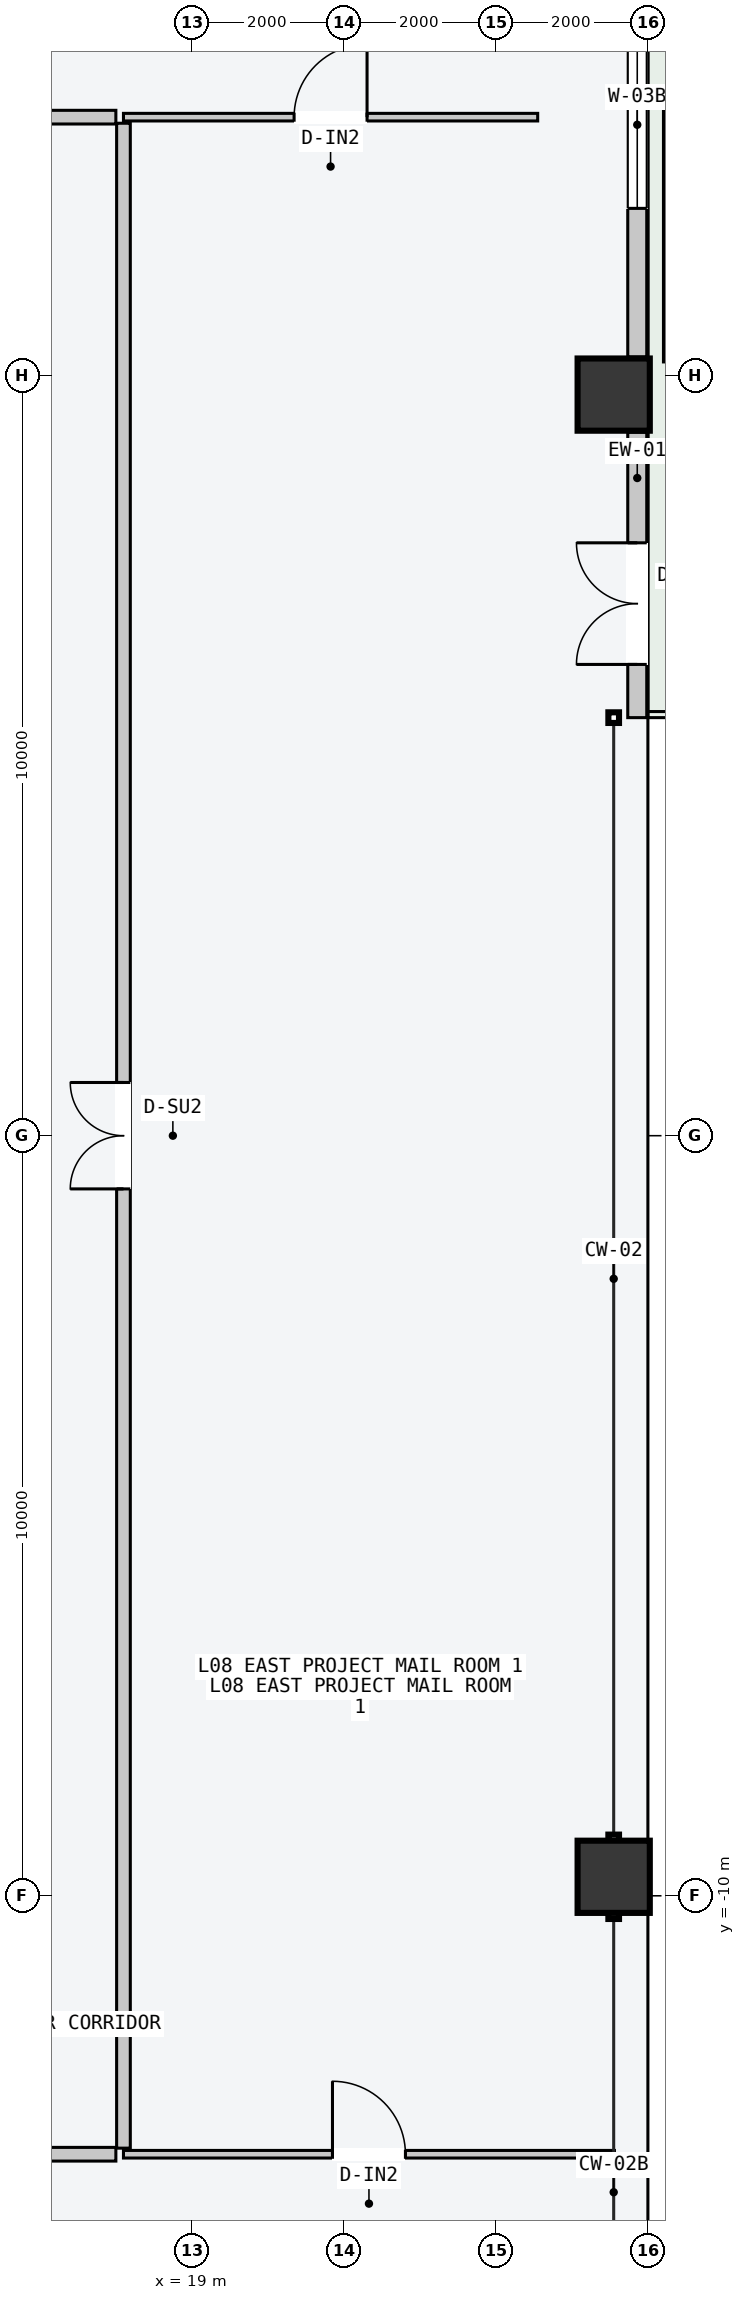
"""IFC4 building model, lengths in metres.
Left out: names, types, materials, properties, quantities, classifications, styles, units other than length and angle.
Written with IfcOpenShell. Run it as: python <this file> out.ifc"""

import sys

from ifc_helpers import new_model, si_unit, direction, frame, frame_2d, origin, origin_2d, place, context, subcontext, project, spatial, rectangle, hollow_rectangle, extrude, element, fill, save


model = new_model("IFC4")
c1 = context("Model", 3, precision=1e-05, world=origin(), true_north=direction((0.0, 1.0)))
c2 = subcontext(c1, "Body", "Model", "MODEL_VIEW")
j1 = project(units=[si_unit("LENGTHUNIT", "METRE"), si_unit("PLANEANGLEUNIT", "RADIAN")], contexts=[c1])
p1 = place(None, origin())
s1 = spatial("IfcSite", under=j1, at=p1, CompositionType="ELEMENT")
p2 = place(p1, origin())
s2 = spatial("IfcBuilding", under=s1, at=p2, CompositionType="ELEMENT")
p3 = place(p2, frame((0.0, 0.0, 34.8)))
s3 = spatial("IfcBuildingStorey", under=s2, at=p3, CompositionType="ELEMENT", Elevation=34.8)
for number, where, z_axis, x_axis in (
    (1, (24.55, -9.75, 0.0), (0.0, 0.0, 1.0), (0.0, 1.0, 0.0)),
    (2, (24.55, 9.75, 0.0), (0.0, 0.0, 1.0), (0.0, 1.0, 0.0)),
):
    element("IfcColumn", number, at=place(p3, frame(where, z_axis=z_axis, x_axis=x_axis)), inside=s3, PredefinedType="COLUMN", context=c2, shape_type="SweptSolid", body=[
        extrude(hollow_rectangle(XDim=0.95, YDim=0.95, WallThickness=0.048, at=origin_2d()), origin(), (0.0, 0.0, 1.0), 3.6),
    ])
p4 = place(p3, frame((24.86, 5.5, 0.0), z_axis=(0.0, 0.0, 1.0), x_axis=(0.0, 1.0, 0.0)))
e3 = element("IfcWall", 3, at=p4, inside=s3, PredefinedType="STANDARD", context=c2, shape_type="SweptSolid", body=[
    extrude(rectangle(XDim=3.755, YDim=0.25, at=frame_2d((1.877, 0.0))), origin(), (0.0, 0.0, 1.0), 3.4),
])
p5 = place(p4, frame((0.7, 0.0, 0.0)))
e4 = element("IfcOpeningElement", 4, at=p5, cuts=e3, PredefinedType="OPENING", context=c2, shape_type="SweptSolid", body=[
    extrude(rectangle(XDim=1.6, YDim=2.2, at=frame_2d((0.8, 1.1))), frame((0.0, 0.135, 0.0), z_axis=(0.0, -1.0, 0.0), x_axis=(1.0, 0.0, 0.0)), (0.0, 0.0, 1.0), 0.27),
])
p6 = place(p3, frame((24.86, 10.245, 0.0), z_axis=(0.0, 0.0, 1.0), x_axis=(0.0, 1.0, 0.0)))
e5 = element("IfcWall", 5, at=p6, inside=s3, PredefinedType="STANDARD", context=c2, shape_type="SweptSolid", body=[
    extrude(rectangle(XDim=7.31, YDim=0.25, at=frame_2d((3.655, 0.0))), origin(), (0.0, 0.0, 1.0), 3.4),
])
p7 = place(p6, frame((1.955, 0.0, 0.85)))
e6 = element("IfcOpeningElement", 6, at=p7, cuts=e5, PredefinedType="OPENING", context=c2, shape_type="SweptSolid", body=[
    extrude(rectangle(XDim=2.2, YDim=2.1, at=frame_2d((1.1, 1.05))), frame((0.0, 0.135, 0.0), z_axis=(0.0, -1.0, 0.0), x_axis=(1.0, 0.0, 0.0)), (0.0, 0.0, 1.0), 0.27),
])
p8 = place(p3, frame((-18.0, 13.4, 0.0), z_axis=(0.0, 0.0, 1.0), x_axis=(1.0, 0.0, 0.0)))
e7 = element("IfcWall", 7, at=p8, inside=s3, PredefinedType="PARTITIONING", context=c2, shape_type="SweptSolid", body=[
    extrude(rectangle(XDim=36.0, YDim=0.18, at=frame_2d((18.0, 0.0))), origin(), (0.0, 0.0, 1.0), 3.4),
])
p9 = place(p8, frame((7.185, 0.0, 0.0)))
e8 = element("IfcOpeningElement", 8, at=p9, cuts=e7, PredefinedType="OPENING", context=c2, shape_type="SweptSolid", body=[
    extrude(rectangle(XDim=1.24, YDim=2.24, at=frame_2d((0.62, 1.12))), frame((0.0, 0.1, 0.0), z_axis=(0.0, -1.0, 0.0), x_axis=(1.0, 0.0, 0.0)), (0.0, 0.0, 1.0), 0.2),
])
p10 = place(p8, frame((21.083, 0.0, 0.0)))
e9 = element("IfcOpeningElement", 9, at=p10, cuts=e7, PredefinedType="OPENING", context=c2, shape_type="SweptSolid", body=[
    extrude(rectangle(XDim=1.4, YDim=2.2, at=frame_2d((0.7, 1.1))), frame((0.0, 0.1, 0.0), z_axis=(0.0, -1.0, 0.0), x_axis=(1.0, 0.0, 0.0)), (0.0, 0.0, 1.0), 0.2),
])
p11 = place(p8, frame((31.528, 0.0, 0.0)))
e10 = element("IfcOpeningElement", 10, at=p11, cuts=e7, PredefinedType="OPENING", context=c2, shape_type="SweptSolid", body=[
    extrude(rectangle(XDim=0.9, YDim=2.15, at=frame_2d((0.45, 1.075))), frame((0.0, 0.1, 0.0), z_axis=(0.0, -1.0, 0.0), x_axis=(1.0, 0.0, 0.0)), (0.0, 0.0, 1.0), 0.2),
])
p12 = place(p3, frame((18.1, 13.4, 0.0), z_axis=(0.0, 0.0, 1.0), x_axis=(1.0, 0.0, 0.0)))
e11 = element("IfcWall", 11, at=p12, inside=s3, PredefinedType="PARTITIONING", context=c2, shape_type="SweptSolid", body=[
    extrude(rectangle(XDim=5.45, YDim=0.1, at=frame_2d((2.725, 0.0))), origin(), (0.0, 0.0, 1.0), 3.4),
])
p13 = place(p12, frame((2.245, 0.0, 0.0)))
e12 = element("IfcOpeningElement", 12, at=p13, cuts=e11, PredefinedType="OPENING", context=c2, shape_type="SweptSolid", body=[
    extrude(rectangle(XDim=0.96, YDim=2.18, at=frame_2d((0.48, 1.09))), frame((0.0, 0.06, 0.0), z_axis=(0.0, -1.0, 0.0), x_axis=(1.0, 0.0, 0.0)), (0.0, 0.0, 1.0), 0.12),
])
p14 = place(p3, frame((-18.0, -13.4, 0.0), z_axis=(0.0, 0.0, 1.0), x_axis=(1.0, 0.0, 0.0)))
e13 = element("IfcWall", 13, at=p14, inside=s3, PredefinedType="PARTITIONING", context=c2, shape_type="SweptSolid", body=[
    extrude(rectangle(XDim=36.0, YDim=0.18, at=frame_2d((18.0, 0.0))), origin(), (0.0, 0.0, 1.0), 3.4),
])
p15 = place(p14, frame((7.255, 0.0, 0.0)))
e14 = element("IfcOpeningElement", 14, at=p15, cuts=e13, PredefinedType="OPENING", context=c2, shape_type="SweptSolid", body=[
    extrude(rectangle(XDim=0.96, YDim=2.18, at=frame_2d((0.48, 1.09))), frame((0.0, 0.1, 0.0), z_axis=(0.0, -1.0, 0.0), x_axis=(1.0, 0.0, 0.0)), (0.0, 0.0, 1.0), 0.2),
])
p16 = place(p14, frame((25.225, 0.0, 0.0)))
e15 = element("IfcOpeningElement", 15, at=p16, cuts=e13, PredefinedType="OPENING", context=c2, shape_type="SweptSolid", body=[
    extrude(rectangle(XDim=1.02, YDim=2.2, at=frame_2d((0.51, 1.1))), frame((0.0, 0.1, 0.0), z_axis=(0.0, -1.0, 0.0), x_axis=(1.0, 0.0, 0.0)), (0.0, 0.0, 1.0), 0.2),
])
p17 = place(p3, frame((18.1, -13.4, 0.0), z_axis=(0.0, 0.0, 1.0), x_axis=(1.0, 0.0, 0.0)))
e16 = element("IfcWall", 16, at=p17, inside=s3, PredefinedType="PARTITIONING", context=c2, shape_type="SweptSolid", body=[
    extrude(rectangle(XDim=6.46, YDim=0.1, at=frame_2d((3.23, 0.0))), origin(), (0.0, 0.0, 1.0), 3.4),
])
p18 = place(p17, frame((2.75, 0.0, 0.0)))
e17 = element("IfcOpeningElement", 17, at=p18, cuts=e16, PredefinedType="OPENING", context=c2, shape_type="SweptSolid", body=[
    extrude(rectangle(XDim=0.96, YDim=2.18, at=frame_2d((0.48, 1.09))), frame((0.0, 0.06, 0.0), z_axis=(0.0, -1.0, 0.0), x_axis=(1.0, 0.0, 0.0)), (0.0, 0.0, 1.0), 0.12),
])
p19 = place(p3, frame((18.1, -13.32, 0.0), z_axis=(0.0, 0.0, 1.0), x_axis=(0.0, 1.0, 0.0)))
e18 = element("IfcWall", 18, at=p19, inside=s3, PredefinedType="PARTITIONING", context=c2, shape_type="SweptSolid", body=[
    extrude(rectangle(XDim=26.64, YDim=0.18, at=frame_2d((13.32, 0.0))), origin(), (0.0, 0.0, 1.0), 3.4),
])
p20 = place(p19, frame((12.62, 0.0, 0.0)))
e19 = element("IfcOpeningElement", 19, at=p20, cuts=e18, PredefinedType="OPENING", context=c2, shape_type="SweptSolid", body=[
    extrude(rectangle(XDim=1.4, YDim=2.2, at=frame_2d((0.7, 1.1))), frame((0.0, 0.1, 0.0), z_axis=(0.0, -1.0, 0.0), x_axis=(1.0, 0.0, 0.0)), (0.0, 0.0, 1.0), 0.2),
])
p21 = place(p5, origin())
e20 = element("IfcDoor", 20, at=p21, inside=s3, OperationType="DOUBLE_DOOR_SINGLE_SWING", PredefinedType="DOOR", context=c2, shape_type="SweptSolid", body=[
    extrude(rectangle(XDim=1.6, YDim=2.2, at=frame_2d((0.8, 1.1))), frame((0.0, 0.025, 0.0), z_axis=(0.0, -1.0, 0.0), x_axis=(1.0, 0.0, 0.0)), (0.0, 0.0, 1.0), 0.05),
])
fill(e4, e20)
p22 = place(p7, origin())
e21 = element("IfcWindow", 21, at=p22, inside=s3, PartitioningType="SINGLE_PANEL", PredefinedType="WINDOW", context=c2, shape_type="SweptSolid", body=[
    extrude(rectangle(XDim=2.2, YDim=2.1, at=frame_2d((1.1, 1.05))), frame((0.0, 0.03, 0.0), z_axis=(0.0, -1.0, 0.0), x_axis=(1.0, 0.0, 0.0)), (0.0, 0.0, 1.0), 0.06),
])
fill(e6, e21)
p23 = place(p13, origin())
e22 = element("IfcDoor", 22, at=p23, inside=s3, OperationType="SINGLE_SWING_RIGHT", PredefinedType="DOOR", context=c2, shape_type="SweptSolid", body=[
    extrude(rectangle(XDim=0.96, YDim=2.18, at=frame_2d((0.48, 1.09))), frame((0.0, 0.025, 0.0), z_axis=(0.0, -1.0, 0.0), x_axis=(1.0, 0.0, 0.0)), (0.0, 0.0, 1.0), 0.05),
])
fill(e12, e22)
p24 = place(p18, origin())
e23 = element("IfcDoor", 23, at=p24, inside=s3, OperationType="SINGLE_SWING_LEFT", PredefinedType="DOOR", context=c2, shape_type="SweptSolid", body=[
    extrude(rectangle(XDim=0.96, YDim=2.18, at=frame_2d((0.48, 1.09))), frame((0.0, 0.025, 0.0), z_axis=(0.0, -1.0, 0.0), x_axis=(1.0, 0.0, 0.0)), (0.0, 0.0, 1.0), 0.05),
])
fill(e17, e23)
p25 = place(p20, origin())
e24 = element("IfcDoor", 24, at=p25, inside=s3, OperationType="DOUBLE_DOOR_SINGLE_SWING", PredefinedType="DOOR", context=c2, shape_type="SweptSolid", body=[
    extrude(rectangle(XDim=1.4, YDim=2.2, at=frame_2d((0.7, 1.1))), frame((0.0, 0.025, 0.0), z_axis=(0.0, -1.0, 0.0), x_axis=(1.0, 0.0, 0.0)), (0.0, 0.0, 1.0), 0.05),
])
fill(e19, e24)
save(model, sys.argv[1])
